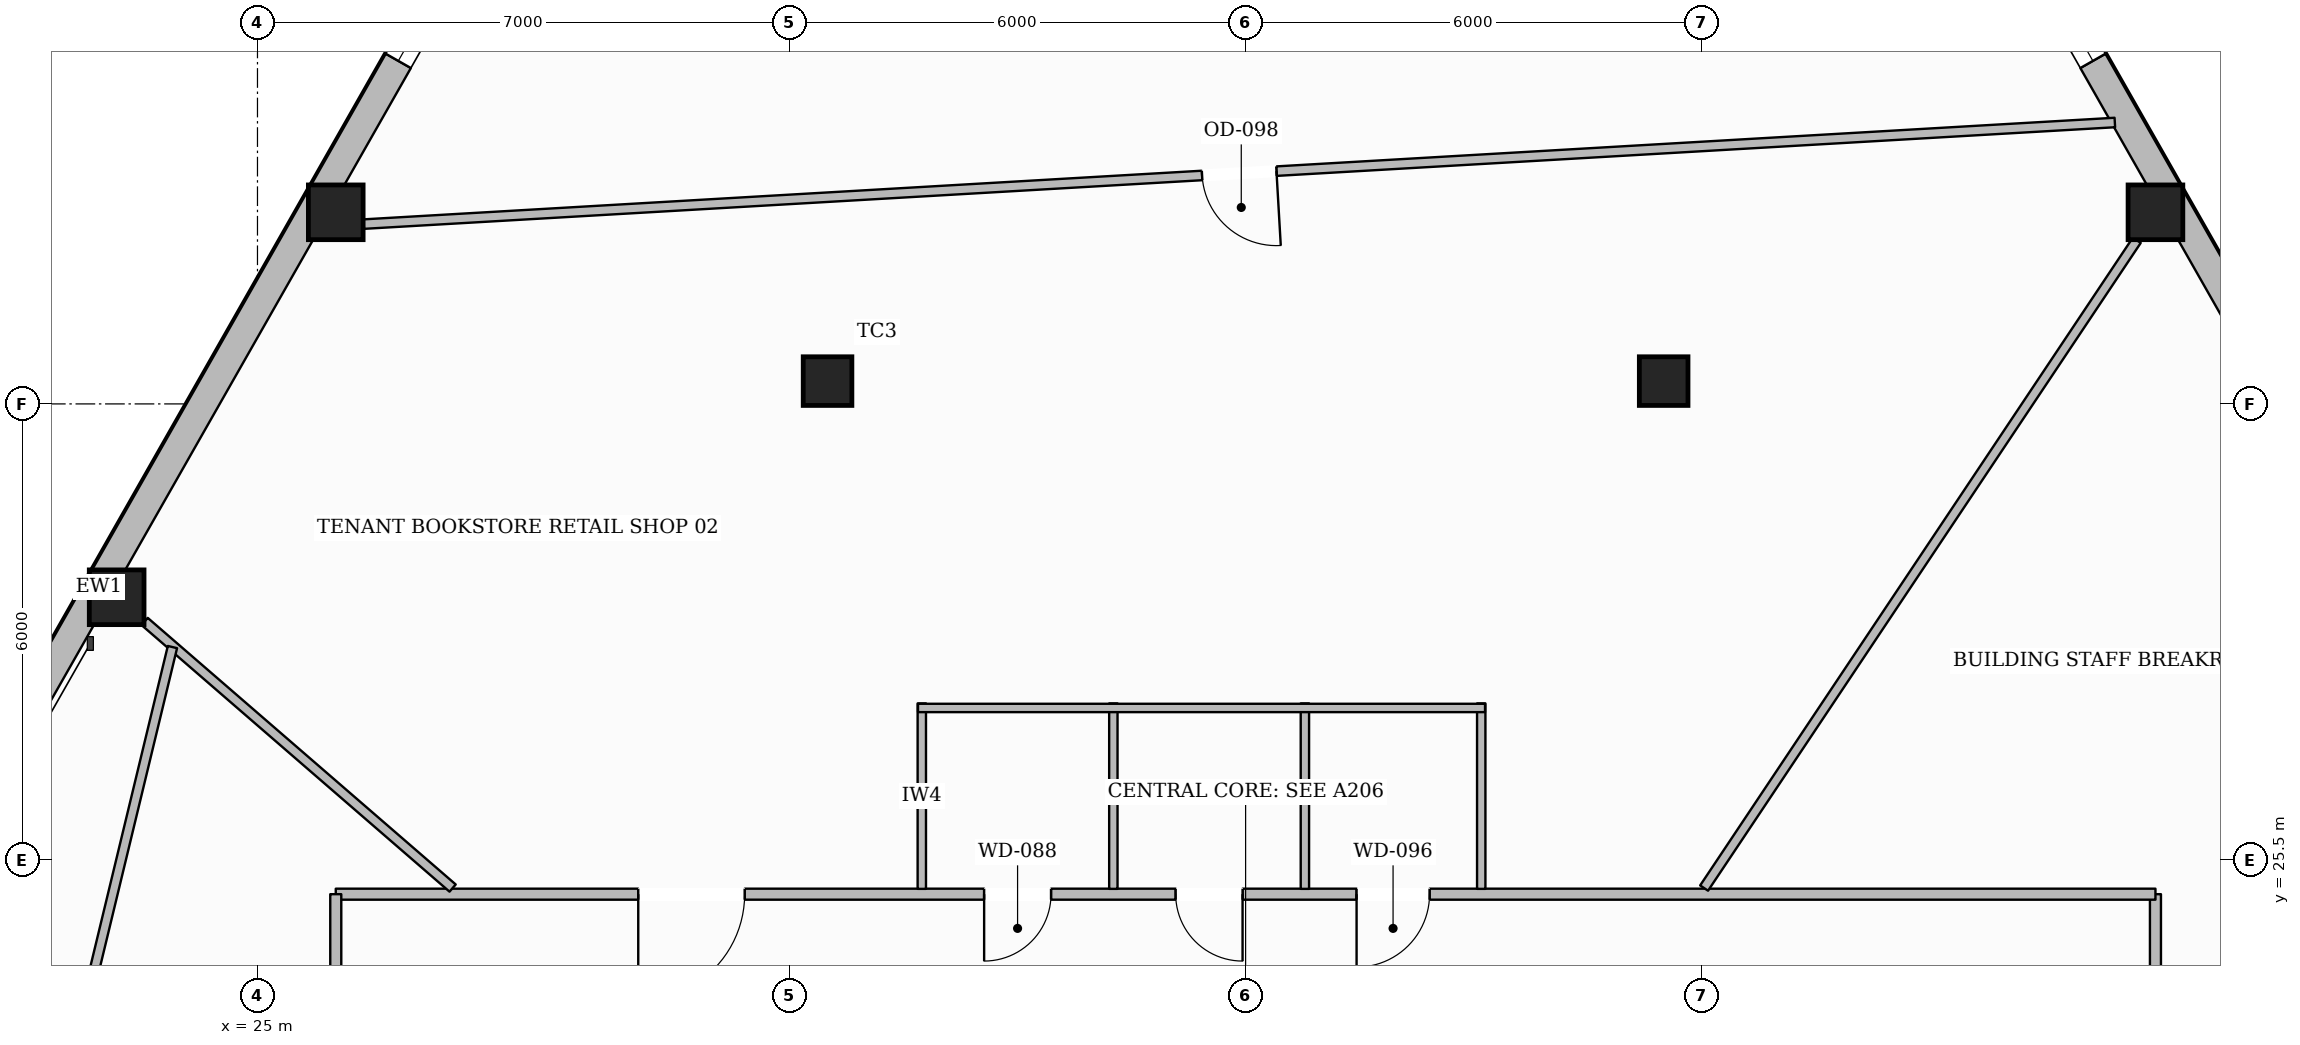
"""IFC4 building model, lengths in metres.
Left out: names, types, materials, properties, quantities, classifications, styles, units other than length and angle.
Written with IfcOpenShell. Run it as: python <this file> out.ifc"""

import sys

from ifc_helpers import new_model, si_unit, direction, frame, frame_2d, origin, origin_2d, place, context, subcontext, project, spatial, rectangle, hollow_rectangle, extrude, element, fill, save


model = new_model("IFC4")
c1 = context("Model", 3, precision=1e-05, world=origin(), true_north=direction((0.0, 1.0)))
c2 = subcontext(c1, "Body", "Model", "MODEL_VIEW")
j1 = project(units=[si_unit("LENGTHUNIT", "METRE"), si_unit("PLANEANGLEUNIT", "RADIAN")], contexts=[c1])
p1 = place(None, origin())
s1 = spatial("IfcSite", under=j1, at=p1, CompositionType="ELEMENT")
p2 = place(p1, origin())
s2 = spatial("IfcBuilding", under=s1, at=p2, CompositionType="ELEMENT")
p3 = place(p2, frame((0.0, 0.0, 93.2)))
s3 = spatial("IfcBuildingStorey", under=s2, at=p3, CompositionType="ELEMENT", Elevation=93.2)
for number, where, z_axis, x_axis in (
    (1, (26.03, 34.021, 0.0), (0.0, 0.0, 1.0), (1.0, 0.0, 0.0)),
    (2, (23.147, 28.956, 0.0), (0.0, 0.0, 1.0), (1.0, 0.0, 0.0)),
    (3, (49.97, 34.021, 0.0), (0.0, 0.0, 1.0), (1.0, 0.0, 0.0)),
):
    element("IfcColumn", number, at=place(p3, frame(where, z_axis=z_axis, x_axis=x_axis)), inside=s3, PredefinedType="COLUMN", context=c2, shape_type="SweptSolid", body=[
        extrude(hollow_rectangle(XDim=0.72, YDim=0.72, WallThickness=0.032, at=origin_2d()), origin(), (0.0, 0.0, 1.0), 3.6),
    ])
for number, where, z_axis, x_axis in (
    (4, (32.5, 31.8, 0.0), (0.0, 0.0, 1.0), (1.0, 0.0, 0.0)),
    (5, (43.5, 31.8, 0.0), (0.0, 0.0, 1.0), (1.0, 0.0, 0.0)),
):
    element("IfcColumn", number, at=place(p3, frame(where, z_axis=z_axis, x_axis=x_axis)), inside=s3, PredefinedType="COLUMN", context=c2, shape_type="SweptSolid", body=[
        extrude(hollow_rectangle(XDim=0.64, YDim=0.64, WallThickness=0.028, at=origin_2d()), origin(), (0.0, 0.0, 1.0), 3.6),
    ])
p4 = place(p3, frame((14.031, 13.485, 0.0), z_axis=(0.0, 0.0, 1.0), x_axis=(0.494642620698, 0.869096472084, 0.0)))
e6 = element("IfcWall", 6, at=p4, inside=s3, PredefinedType="STANDARD", context=c2, shape_type="SweptSolid", body=[
    extrude(rectangle(XDim=35.916, YDim=0.38, at=frame_2d((17.958, 0.0))), origin(), (0.0, 0.0, 1.0), 3.059),
])
p5 = place(p4, frame((31.748, 0.0, 0.65)))
e7 = element("IfcOpeningElement", 7, at=p5, cuts=e6, PredefinedType="OPENING", context=c2, shape_type="SweptSolid", body=[
    extrude(rectangle(XDim=1.55, YDim=1.75, at=frame_2d((0.775, 0.875))), frame((0.0, 0.2, 0.0), z_axis=(0.0, -1.0, 0.0), x_axis=(1.0, 0.0, 0.0)), (0.0, 0.0, 1.0), 0.4),
])
p6 = place(p4, frame((25.921, 0.0, 0.65)))
e8 = element("IfcOpeningElement", 8, at=p6, cuts=e6, PredefinedType="OPENING", context=c2, shape_type="SweptSolid", body=[
    extrude(rectangle(XDim=1.55, YDim=1.75, at=frame_2d((0.775, 0.875))), frame((0.0, 0.2, 0.0), z_axis=(0.0, -1.0, 0.0), x_axis=(1.0, 0.0, 0.0)), (0.0, 0.0, 1.0), 0.4),
])
p7 = place(p4, frame((8.439, 0.0, 0.65)))
e9 = element("IfcOpeningElement", 9, at=p7, cuts=e6, PredefinedType="OPENING", context=c2, shape_type="SweptSolid", body=[
    extrude(rectangle(XDim=1.55, YDim=1.75, at=frame_2d((0.775, 0.875))), frame((0.0, 0.2, 0.0), z_axis=(0.0, -1.0, 0.0), x_axis=(1.0, 0.0, 0.0)), (0.0, 0.0, 1.0), 0.4),
])
p8 = place(p4, frame((2.612, 0.0, 0.65)))
e10 = element("IfcOpeningElement", 10, at=p8, cuts=e6, PredefinedType="OPENING", context=c2, shape_type="SweptSolid", body=[
    extrude(rectangle(XDim=1.55, YDim=1.75, at=frame_2d((0.775, 0.875))), frame((0.0, 0.2, 0.0), z_axis=(0.0, -1.0, 0.0), x_axis=(1.0, 0.0, 0.0)), (0.0, 0.0, 1.0), 0.4),
])
p9 = place(p3, frame((44.203, 44.699, 0.0), z_axis=(0.0, 0.0, 1.0), x_axis=(0.494642620698, -0.869096472084, 0.0)))
e11 = element("IfcWall", 11, at=p9, inside=s3, PredefinedType="STANDARD", context=c2, shape_type="SweptSolid", body=[
    extrude(rectangle(XDim=35.916, YDim=0.38, at=frame_2d((17.958, 0.0))), origin(), (0.0, 0.0, 1.0), 3.059),
])
p10 = place(p9, frame((31.754, 0.0, 0.65)))
e12 = element("IfcOpeningElement", 12, at=p10, cuts=e11, PredefinedType="OPENING", context=c2, shape_type="SweptSolid", body=[
    extrude(rectangle(XDim=1.55, YDim=1.75, at=frame_2d((0.775, 0.875))), frame((0.0, 0.2, 0.0), z_axis=(0.0, -1.0, 0.0), x_axis=(1.0, 0.0, 0.0)), (0.0, 0.0, 1.0), 0.4),
])
p11 = place(p9, frame((25.927, 0.0, 0.65)))
e13 = element("IfcOpeningElement", 13, at=p11, cuts=e11, PredefinedType="OPENING", context=c2, shape_type="SweptSolid", body=[
    extrude(rectangle(XDim=1.55, YDim=1.75, at=frame_2d((0.775, 0.875))), frame((0.0, 0.2, 0.0), z_axis=(0.0, -1.0, 0.0), x_axis=(1.0, 0.0, 0.0)), (0.0, 0.0, 1.0), 0.4),
])
p12 = place(p9, frame((14.272, 0.0, 0.65)))
e14 = element("IfcOpeningElement", 14, at=p12, cuts=e11, PredefinedType="OPENING", context=c2, shape_type="SweptSolid", body=[
    extrude(rectangle(XDim=1.55, YDim=1.75, at=frame_2d((0.775, 0.875))), frame((0.0, 0.2, 0.0), z_axis=(0.0, -1.0, 0.0), x_axis=(1.0, 0.0, 0.0)), (0.0, 0.0, 1.0), 0.4),
])
p13 = place(p9, frame((8.445, 0.0, 0.65)))
e15 = element("IfcOpeningElement", 15, at=p13, cuts=e11, PredefinedType="OPENING", context=c2, shape_type="SweptSolid", body=[
    extrude(rectangle(XDim=1.55, YDim=1.75, at=frame_2d((0.775, 0.875))), frame((0.0, 0.2, 0.0), z_axis=(0.0, -1.0, 0.0), x_axis=(1.0, 0.0, 0.0)), (0.0, 0.0, 1.0), 0.4),
])
p14 = place(p9, frame((2.618, 0.0, 0.65)))
e16 = element("IfcOpeningElement", 16, at=p14, cuts=e11, PredefinedType="OPENING", context=c2, shape_type="SweptSolid", body=[
    extrude(rectangle(XDim=1.55, YDim=1.75, at=frame_2d((0.775, 0.875))), frame((0.0, 0.2, 0.0), z_axis=(0.0, -1.0, 0.0), x_axis=(1.0, 0.0, 0.0)), (0.0, 0.0, 1.0), 0.4),
])
p15 = place(p3, frame((49.97, 7.15, 0.0), z_axis=(0.0, 0.0, 1.0), x_axis=(0.0, 1.0, 0.0)))
e17 = element("IfcWall", 17, at=p15, inside=s3, PredefinedType="PARTITIONING", context=c2, shape_type="SweptSolid", body=[
    extrude(rectangle(XDim=17.9, YDim=0.145, at=frame_2d((8.95, 0.0))), origin(), (0.0, 0.0, 1.0), 3.288),
])
p16 = place(p15, frame((13.437, 0.0, 0.0)))
e18 = element("IfcOpeningElement", 18, at=p16, cuts=e17, PredefinedType="OPENING", context=c2, shape_type="SweptSolid", body=[
    extrude(rectangle(XDim=1.4, YDim=2.2, at=frame_2d((0.7, 1.1))), frame((0.0, 0.083, 0.0), z_axis=(0.0, -1.0, 0.0), x_axis=(1.0, 0.0, 0.0)), (0.0, 0.0, 1.0), 0.165),
])
p17 = place(p15, frame((4.658, 0.0, 0.0)))
e19 = element("IfcOpeningElement", 19, at=p17, cuts=e17, PredefinedType="OPENING", context=c2, shape_type="SweptSolid", body=[
    extrude(rectangle(XDim=1.4, YDim=2.2, at=frame_2d((0.7, 1.1))), frame((0.0, 0.083, 0.0), z_axis=(0.0, -1.0, 0.0), x_axis=(1.0, 0.0, 0.0)), (0.0, 0.0, 1.0), 0.165),
])
p18 = place(p3, frame((49.97, 25.05, 0.0), z_axis=(0.0, 0.0, 1.0), x_axis=(-1.0, 0.0, 0.0)))
e20 = element("IfcWall", 20, at=p18, inside=s3, PredefinedType="PARTITIONING", context=c2, shape_type="SweptSolid", body=[
    extrude(rectangle(XDim=23.94, YDim=0.145, at=frame_2d((11.97, 0.0))), origin(), (0.0, 0.0, 1.0), 3.6),
])
p19 = place(p18, frame((14.53, 0.0, 0.0)))
e21 = element("IfcOpeningElement", 21, at=p19, cuts=e20, PredefinedType="OPENING", context=c2, shape_type="SweptSolid", body=[
    extrude(rectangle(XDim=0.88, YDim=2.1, at=frame_2d((0.44, 1.05))), frame((0.0, 0.083, 0.0), z_axis=(0.0, -1.0, 0.0), x_axis=(1.0, 0.0, 0.0)), (0.0, 0.0, 1.0), 0.165),
])
p20 = place(p18, frame((12.01, 0.0, 0.0)))
e22 = element("IfcOpeningElement", 22, at=p20, cuts=e20, PredefinedType="OPENING", context=c2, shape_type="SweptSolid", body=[
    extrude(rectangle(XDim=0.88, YDim=2.1, at=frame_2d((0.44, 1.05))), frame((0.0, 0.083, 0.0), z_axis=(0.0, -1.0, 0.0), x_axis=(1.0, 0.0, 0.0)), (0.0, 0.0, 1.0), 0.165),
])
p21 = place(p18, frame((9.55, 0.0, 0.0)))
e23 = element("IfcOpeningElement", 23, at=p21, cuts=e20, PredefinedType="OPENING", context=c2, shape_type="SweptSolid", body=[
    extrude(rectangle(XDim=0.96, YDim=2.1, at=frame_2d((0.48, 1.05))), frame((0.0, 0.083, 0.0), z_axis=(0.0, -1.0, 0.0), x_axis=(1.0, 0.0, 0.0)), (0.0, 0.0, 1.0), 0.165),
])
p22 = place(p18, frame((18.561, 0.0, 0.0)))
e24 = element("IfcOpeningElement", 24, at=p22, cuts=e20, PredefinedType="OPENING", context=c2, shape_type="SweptSolid", body=[
    extrude(rectangle(XDim=1.4, YDim=2.2, at=frame_2d((0.7, 1.1))), frame((0.0, 0.083, 0.0), z_axis=(0.0, -1.0, 0.0), x_axis=(1.0, 0.0, 0.0)), (0.0, 0.0, 1.0), 0.165),
])
p23 = place(p3, frame((26.03, 25.05, 0.0), z_axis=(0.0, 0.0, 1.0), x_axis=(0.0, -1.0, 0.0)))
e25 = element("IfcWall", 25, at=p23, inside=s3, PredefinedType="PARTITIONING", context=c2, shape_type="SweptSolid", body=[
    extrude(rectangle(XDim=17.9, YDim=0.145, at=frame_2d((8.95, 0.0))), origin(), (0.0, 0.0, 1.0), 3.288),
])
p24 = place(p23, frame((4.67, 0.0, 0.0)))
e26 = element("IfcOpeningElement", 26, at=p24, cuts=e25, PredefinedType="OPENING", context=c2, shape_type="SweptSolid", body=[
    extrude(rectangle(XDim=0.98, YDim=2.15, at=frame_2d((0.49, 1.075))), frame((0.0, 0.083, 0.0), z_axis=(0.0, -1.0, 0.0), x_axis=(1.0, 0.0, 0.0)), (0.0, 0.0, 1.0), 0.165),
])
p25 = place(p23, frame((12.799, 0.0, 0.0)))
e27 = element("IfcOpeningElement", 27, at=p25, cuts=e25, PredefinedType="OPENING", context=c2, shape_type="SweptSolid", body=[
    extrude(rectangle(XDim=1.4, YDim=2.2, at=frame_2d((0.7, 1.1))), frame((0.0, 0.083, 0.0), z_axis=(0.0, -1.0, 0.0), x_axis=(1.0, 0.0, 0.0)), (0.0, 0.0, 1.0), 0.165),
])
for number, where, z_axis, x_axis in (
    (28, (33.74, 25.12, 0.0), (0.0, 0.0, 1.0), (0.0, 1.0, 0.0)),
    (29, (36.26, 25.12, 0.0), (0.0, 0.0, 1.0), (0.0, 1.0, 0.0)),
    (30, (38.78, 25.12, 0.0), (0.0, 0.0, 1.0), (0.0, 1.0, 0.0)),
    (31, (41.1, 25.12, 0.0), (0.0, 0.0, 1.0), (0.0, 1.0, 0.0)),
):
    element("IfcWall", number, at=place(p3, frame(where, z_axis=z_axis, x_axis=x_axis)), inside=s3, PredefinedType="PLUMBINGWALL", context=c2, shape_type="SweptSolid", body=[
        extrude(rectangle(XDim=2.44, YDim=0.11, at=frame_2d((1.22, 0.0))), origin(), (0.0, 0.0, 1.0), 3.6),
    ])
p26 = place(p3, frame((33.69, 27.5, 0.0), z_axis=(0.0, 0.0, 1.0), x_axis=(1.0, 0.0, 0.0)))
e32 = element("IfcWall", 32, at=p26, inside=s3, PredefinedType="PLUMBINGWALL", context=c2, shape_type="SweptSolid", body=[
    extrude(rectangle(XDim=7.46, YDim=0.11, at=frame_2d((3.73, 0.0))), origin(), (0.0, 0.0, 1.0), 3.6),
])
p27 = place(p3, frame((44.032, 25.131, 0.0), z_axis=(0.0, 0.0, 1.0), x_axis=(0.555447635276, 0.831551516424, 0.0)))
e33 = element("IfcWall", 33, at=p27, inside=s3, PredefinedType="PARTITIONING", context=c2, shape_type="SweptSolid", body=[
    extrude(rectangle(XDim=10.248, YDim=0.125, at=frame_2d((5.124, 0.0))), origin(), (0.0, 0.0, 1.0), 3.6),
])
p28 = place(p3, frame((27.567, 25.131, 0.0), z_axis=(0.0, 0.0, 1.0), x_axis=(-0.756118826097, 0.654434351804, 0.0)))
e34 = element("IfcWall", 34, at=p28, inside=s3, PredefinedType="PARTITIONING", context=c2, shape_type="SweptSolid", body=[
    extrude(rectangle(XDim=5.359, YDim=0.125, at=frame_2d((2.679, 0.0))), origin(), (0.0, 0.0, 1.0), 3.141),
])
p29 = place(p3, frame((49.436, 35.202, 0.0), z_axis=(0.0, 0.0, 1.0), x_axis=(-0.998321077016, -0.057922596506, 0.0)))
e35 = element("IfcWall", 35, at=p29, inside=s3, PredefinedType="PARTITIONING", context=c2, shape_type="SweptSolid", body=[
    extrude(rectangle(XDim=23.077, YDim=0.125, at=frame_2d((11.539, 0.0))), origin(), (0.0, 0.0, 1.0), 3.6),
])
p30 = place(p29, frame((11.048, 0.0, 0.0)))
e36 = element("IfcOpeningElement", 36, at=p30, cuts=e35, PredefinedType="OPENING", context=c2, shape_type="SweptSolid", body=[
    extrude(rectangle(XDim=0.98, YDim=2.15, at=frame_2d((0.49, 1.075))), frame((0.0, 0.073, 0.0), z_axis=(0.0, -1.0, 0.0), x_axis=(1.0, 0.0, 0.0)), (0.0, 0.0, 1.0), 0.145),
])
p31 = place(p3, frame((23.881, 28.301, 0.0), z_axis=(0.0, 0.0, 1.0), x_axis=(-0.234828781447, -0.972036750027, 0.0)))
e37 = element("IfcWall", 37, at=p31, inside=s3, PredefinedType="PARTITIONING", context=c2, shape_type="SweptSolid", body=[
    extrude(rectangle(XDim=14.325, YDim=0.125, at=frame_2d((7.163, 0.0))), origin(), (0.0, 0.0, 1.0), 3.288),
])
p32 = place(p31, frame((6.679, 0.0, 0.0)))
e38 = element("IfcOpeningElement", 38, at=p32, cuts=e37, PredefinedType="OPENING", context=c2, shape_type="SweptSolid", body=[
    extrude(rectangle(XDim=0.98, YDim=2.15, at=frame_2d((0.49, 1.075))), frame((0.0, 0.073, 0.0), z_axis=(0.0, -1.0, 0.0), x_axis=(1.0, 0.0, 0.0)), (0.0, 0.0, 1.0), 0.145),
])
p33 = place(p6, origin())
e39 = element("IfcWindow", 39, at=p33, inside=s3, PartitioningType="SINGLE_PANEL", PredefinedType="WINDOW", context=c2, shape_type="SweptSolid", body=[
    extrude(rectangle(XDim=1.55, YDim=1.75, at=frame_2d((0.775, 0.875))), frame((0.0, 0.03, 0.0), z_axis=(0.0, -1.0, 0.0), x_axis=(1.0, 0.0, 0.0)), (0.0, 0.0, 1.0), 0.06),
])
fill(e8, e39)
p34 = place(p13, origin())
e40 = element("IfcWindow", 40, at=p34, inside=s3, PartitioningType="SINGLE_PANEL", PredefinedType="WINDOW", context=c2, shape_type="SweptSolid", body=[
    extrude(rectangle(XDim=1.55, YDim=1.75, at=frame_2d((0.775, 0.875))), frame((0.0, 0.03, 0.0), z_axis=(0.0, -1.0, 0.0), x_axis=(1.0, 0.0, 0.0)), (0.0, 0.0, 1.0), 0.06),
])
fill(e15, e40)
p35 = place(p19, origin())
e41 = element("IfcDoor", 41, at=p35, inside=s3, OperationType="SINGLE_SWING_RIGHT", PredefinedType="DOOR", context=c2, shape_type="SweptSolid", body=[
    extrude(rectangle(XDim=0.88, YDim=2.1, at=frame_2d((0.44, 1.05))), frame((0.0, 0.025, 0.0), z_axis=(0.0, -1.0, 0.0), x_axis=(1.0, 0.0, 0.0)), (0.0, 0.0, 1.0), 0.05),
])
fill(e21, e41)
p36 = place(p20, origin())
e42 = element("IfcDoor", 42, at=p36, inside=s3, OperationType="SINGLE_SWING_LEFT", PredefinedType="DOOR", context=c2, shape_type="SweptSolid", body=[
    extrude(rectangle(XDim=0.88, YDim=2.1, at=frame_2d((0.44, 1.05))), frame((0.0, 0.025, 0.0), z_axis=(0.0, -1.0, 0.0), x_axis=(1.0, 0.0, 0.0)), (0.0, 0.0, 1.0), 0.05),
])
fill(e22, e42)
p37 = place(p21, origin())
e43 = element("IfcDoor", 43, at=p37, inside=s3, OperationType="SINGLE_SWING_RIGHT", PredefinedType="DOOR", context=c2, shape_type="SweptSolid", body=[
    extrude(rectangle(XDim=0.96, YDim=2.1, at=frame_2d((0.48, 1.05))), frame((0.0, 0.025, 0.0), z_axis=(0.0, -1.0, 0.0), x_axis=(1.0, 0.0, 0.0)), (0.0, 0.0, 1.0), 0.05),
])
fill(e23, e43)
p38 = place(p22, origin())
e44 = element("IfcDoor", 44, at=p38, inside=s3, OperationType="SINGLE_SWING_RIGHT", PredefinedType="DOOR", context=c2, shape_type="SweptSolid", body=[
    extrude(rectangle(XDim=1.4, YDim=2.2, at=frame_2d((0.7, 1.1))), frame((0.0, 0.025, 0.0), z_axis=(0.0, -1.0, 0.0), x_axis=(1.0, 0.0, 0.0)), (0.0, 0.0, 1.0), 0.05),
])
fill(e24, e44)
p39 = place(p30, origin())
e45 = element("IfcDoor", 45, at=p39, inside=s3, OperationType="SINGLE_SWING_LEFT", PredefinedType="DOOR", context=c2, shape_type="SweptSolid", body=[
    extrude(rectangle(XDim=0.98, YDim=2.15, at=frame_2d((0.49, 1.075))), frame((0.0, 0.025, 0.0), z_axis=(0.0, -1.0, 0.0), x_axis=(1.0, 0.0, 0.0)), (0.0, 0.0, 1.0), 0.05),
])
fill(e36, e45)
save(model, sys.argv[1])
